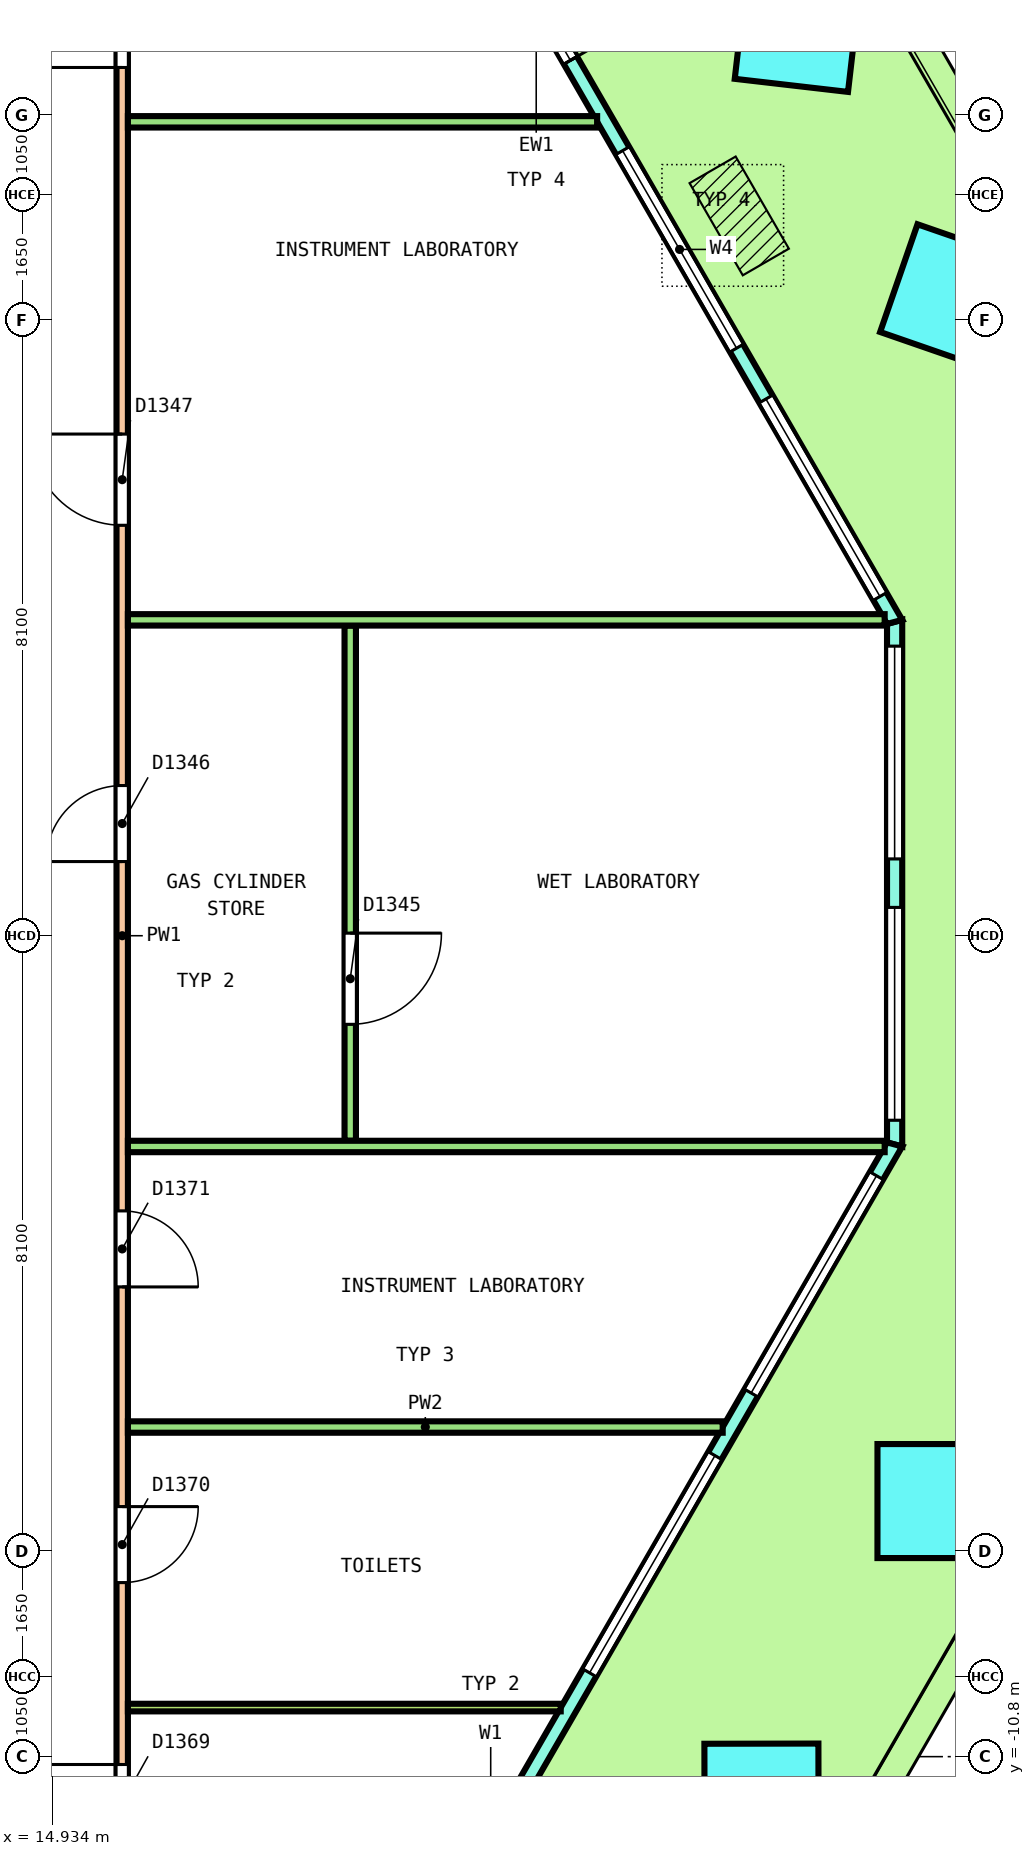
"""IFC4 building model, lengths in metres.
Left out: names, types, materials, properties, quantities, classifications, styles, units other than length and angle.
Written with IfcOpenShell. Run it as: python <this file> out.ifc"""

import sys

from ifc_helpers import new_model, si_unit, direction, frame, frame_2d, origin, origin_2d, place, context, subcontext, project, spatial, polyline, rectangle, outline, extrude, element, fill, save


model = new_model("IFC4")
c1 = context("Model", 3, precision=1e-05, world=origin(), true_north=direction((0.0, 1.0)))
c2 = subcontext(c1, "Body", "Model", "MODEL_VIEW")
j1 = project(units=[si_unit("LENGTHUNIT", "METRE"), si_unit("PLANEANGLEUNIT", "RADIAN")], contexts=[c1])
p1 = place(None, origin())
s1 = spatial("IfcSite", under=j1, at=p1, CompositionType="ELEMENT")
p2 = place(p1, origin())
s2 = spatial("IfcBuilding", under=s1, at=p2, CompositionType="ELEMENT")
p3 = place(p2, frame((0.0, 0.0, 36.6)))
s3 = spatial("IfcBuildingStorey", under=s2, at=p3, CompositionType="ELEMENT", Elevation=36.6)
p4 = place(p3, frame((26.776, 8.406, 0.0), z_axis=(0.021750666956, 0.025184982791, 0.999446159195), x_axis=(-0.501141735437, 0.865296589037, -0.010898348669)))
e1 = element("IfcColumn", 1, at=p4, inside=s3, PredefinedType="COLUMN", context=c2, shape_type="SweptSolid", body=[
    extrude(rectangle(XDim=1.5, YDim=1.5, at=origin_2d()), origin(), (0.0, 0.0, 1.0), 4.052),
])
p5 = place(p3, frame((24.74, 11.932, 0.0), z_axis=(0.025367110012, 0.018859632859, 0.999500287133), x_axis=(-0.500693075872, 0.865617292239, -0.003625899899)))
e2 = element("IfcColumn", 2, at=p5, inside=s3, PredefinedType="COLUMN", context=c2, shape_type="SweptSolid", body=[
    extrude(rectangle(XDim=1.5, YDim=1.5, at=origin_2d()), origin(), (0.0, 0.0, 1.0), 4.052),
])
p6 = place(p3, frame((24.261, -11.379, 0.0), z_axis=(0.003616977835, 0.006269428248, 0.999973805527), x_axis=(0.498177151135, 0.867045061108, -0.007237962107)))
e3 = element("IfcColumn", 3, at=p6, inside=s3, PredefinedType="COLUMN", context=c2, shape_type="SweptSolid", body=[
    extrude(rectangle(XDim=1.5, YDim=1.5, at=origin_2d()), origin(), (0.0, 0.0, 1.0), 4.05),
])
p7 = place(p3, frame((26.536, -7.438, 0.0), z_axis=(0.010848648059, 0.01886459357, 0.999763188933), x_axis=(0.498562444949, 0.866580592009, -0.021761572546)))
e4 = element("IfcColumn", 4, at=p7, inside=s3, PredefinedType="COLUMN", context=c2, shape_type="SweptSolid", body=[
    extrude(rectangle(XDim=1.5, YDim=1.5, at=origin_2d()), origin(), (0.0, 0.0, 1.0), 4.051),
])
p8 = place(p3, frame((26.012, -2.746, 0.0), z_axis=(0.0, 0.0, 1.0), x_axis=(0.0, 1.0, 0.0)))
e5 = element("IfcWall", 5, at=p8, inside=s3, PredefinedType="SOLIDWALL", context=c2, shape_type="SweptSolid", body=[
    extrude(outline(polyline([(-0.027, -0.1), (1.128, -0.1), (2.282, -0.1), (3.437, -0.1), (4.592, -0.1), (5.747, -0.1), (6.901, -0.1), (6.848, 0.1), (5.711, 0.1), (4.574, 0.1), (3.437, 0.1), (2.301, 0.1), (1.164, 0.1), (0.027, 0.1), (-0.027, -0.1)])), origin(), (0.0, 0.0, 1.0), 4.1),
])
p9 = place(p8, frame((0.319, 0.0, 0.1)))
e6 = element("IfcOpeningElement", 6, at=p9, cuts=e5, PredefinedType="OPENING", context=c2, shape_type="SweptSolid", body=[
    extrude(rectangle(XDim=2.8, YDim=2.9, at=frame_2d((1.4, 1.45))), frame((0.0, 0.11, 0.0), z_axis=(0.0, -1.0, 0.0), x_axis=(1.0, 0.0, 0.0)), (0.0, 0.0, 1.0), 0.22),
])
p10 = place(p8, frame((3.756, 0.0, 0.1)))
e7 = element("IfcOpeningElement", 7, at=p10, cuts=e5, PredefinedType="OPENING", context=c2, shape_type="SweptSolid", body=[
    extrude(rectangle(XDim=2.8, YDim=2.9, at=frame_2d((1.4, 1.45))), frame((0.0, 0.11, 0.0), z_axis=(0.0, -1.0, 0.0), x_axis=(1.0, 0.0, 0.0)), (0.0, 0.0, 1.0), 0.22),
])
p11 = place(p3, frame((26.012, 4.129, 0.0), z_axis=(0.0, 0.0, 1.0), x_axis=(-0.499999588275, 0.866025641494, 0.0)))
e8 = element("IfcWall", 8, at=p11, inside=s3, PredefinedType="SOLIDWALL", context=c2, shape_type="SweptSolid", body=[
    extrude(outline(polyline([(-0.027, -0.1), (1.024, -0.1), (2.075, -0.1), (3.125, -0.1), (4.176, -0.1), (5.227, -0.1), (6.278, -0.1), (7.329, -0.1), (8.38, -0.1), (9.43, -0.1), (10.481, -0.1), (11.532, -0.1), (12.583, -0.1), (13.634, -0.1), (14.685, -0.1), (15.735, -0.1), (16.786, -0.1), (17.837, -0.1), (18.888, -0.1), (18.834, 0.1), (17.789, 0.1), (16.744, 0.1), (15.699, 0.1), (14.655, 0.1), (13.61, 0.1), (12.565, 0.1), (11.52, 0.1), (10.475, 0.1), (9.43, 0.1), (8.385, 0.1), (7.341, 0.1), (6.296, 0.1), (5.251, 0.1), (4.206, 0.1), (3.161, 0.1), (2.116, 0.1), (1.072, 0.1), (0.027, 0.1), (-0.027, -0.1)])), origin(), (0.0, 0.0, 1.0), 4.1),
])
p12 = place(p11, frame((0.386, 0.0, 0.1)))
e9 = element("IfcOpeningElement", 9, at=p12, cuts=e8, PredefinedType="OPENING", context=c2, shape_type="SweptSolid", body=[
    extrude(rectangle(XDim=3.0, YDim=2.9, at=frame_2d((1.5, 1.45))), frame((0.0, 0.11, 0.0), z_axis=(0.0, -1.0, 0.0), x_axis=(1.0, 0.0, 0.0)), (0.0, 0.0, 1.0), 0.22),
])
p13 = place(p11, frame((4.158, 0.0, 0.1)))
e10 = element("IfcOpeningElement", 10, at=p13, cuts=e8, PredefinedType="OPENING", context=c2, shape_type="SweptSolid", body=[
    extrude(rectangle(XDim=3.0, YDim=2.9, at=frame_2d((1.5, 1.45))), frame((0.0, 0.11, 0.0), z_axis=(0.0, -1.0, 0.0), x_axis=(1.0, 0.0, 0.0)), (0.0, 0.0, 1.0), 0.22),
])
p14 = place(p11, frame((8.531, 0.0, 0.0)))
e11 = element("IfcOpeningElement", 11, at=p14, cuts=e8, PredefinedType="OPENING", context=c2, shape_type="SweptSolid", body=[
    extrude(rectangle(XDim=1.8, YDim=2.4, at=frame_2d((0.9, 1.2))), frame((0.0, 0.11, 0.0), z_axis=(0.0, -1.0, 0.0), x_axis=(1.0, 0.0, 0.0)), (0.0, 0.0, 1.0), 0.22),
])
p15 = place(p11, frame((8.531, 0.0, 2.55)))
e12 = element("IfcOpeningElement", 12, at=p15, cuts=e8, PredefinedType="OPENING", context=c2, shape_type="SweptSolid", body=[
    extrude(rectangle(XDim=1.8, YDim=0.45, at=frame_2d((0.9, 0.225))), frame((0.0, 0.11, 0.0), z_axis=(0.0, -1.0, 0.0), x_axis=(1.0, 0.0, 0.0)), (0.0, 0.0, 1.0), 0.22),
])
p16 = place(p11, frame((11.703, 0.0, 0.1)))
e13 = element("IfcOpeningElement", 13, at=p16, cuts=e8, PredefinedType="OPENING", context=c2, shape_type="SweptSolid", body=[
    extrude(rectangle(XDim=3.0, YDim=2.9, at=frame_2d((1.5, 1.45))), frame((0.0, 0.11, 0.0), z_axis=(0.0, -1.0, 0.0), x_axis=(1.0, 0.0, 0.0)), (0.0, 0.0, 1.0), 0.22),
])
p17 = place(p11, frame((15.475, 0.0, 0.1)))
e14 = element("IfcOpeningElement", 14, at=p17, cuts=e8, PredefinedType="OPENING", context=c2, shape_type="SweptSolid", body=[
    extrude(rectangle(XDim=3.0, YDim=2.9, at=frame_2d((1.5, 1.45))), frame((0.0, 0.11, 0.0), z_axis=(0.0, -1.0, 0.0), x_axis=(1.0, 0.0, 0.0)), (0.0, 0.0, 1.0), 0.22),
])
p18 = place(p3, frame((15.384, -21.154, 0.0), z_axis=(0.0, 0.0, 1.0), x_axis=(0.499998188434, 0.86602644969, 0.0)))
e15 = element("IfcWall", 15, at=p18, inside=s3, PredefinedType="SOLIDWALL", context=c2, shape_type="SweptSolid", body=[
    extrude(outline(polyline([(-0.027, -0.1), (0.988, -0.1), (2.003, -0.1), (3.017, -0.1), (4.032, -0.1), (5.047, -0.1), (6.062, -0.1), (7.076, -0.1), (8.091, -0.1), (9.106, -0.1), (10.121, -0.1), (11.135, -0.1), (12.15, -0.1), (13.165, -0.1), (14.179, -0.1), (15.194, -0.1), (16.209, -0.1), (17.224, -0.1), (18.239, -0.1), (19.253, -0.1), (20.268, -0.1), (21.283, -0.1), (21.229, 0.1), (20.219, 0.1), (19.21, 0.1), (18.2, 0.1), (17.19, 0.1), (16.181, 0.1), (15.171, 0.1), (14.162, 0.1), (13.152, 0.1), (12.142, 0.1), (11.133, 0.1), (10.123, 0.1), (9.114, 0.1), (8.104, 0.1), (7.094, 0.1), (6.085, 0.1), (5.075, 0.1), (4.065, 0.1), (3.056, 0.1), (2.046, 0.1), (1.036, 0.1), (0.027, 0.1), (-0.027, -0.1)])), origin(), (0.0, 0.0, 1.0), 4.1),
])
p19 = place(p18, frame((0.476, 0.0, 0.1)))
e16 = element("IfcOpeningElement", 16, at=p19, cuts=e15, PredefinedType="OPENING", context=c2, shape_type="SweptSolid", body=[
    extrude(rectangle(XDim=3.3, YDim=2.9, at=frame_2d((1.65, 1.45))), frame((0.0, 0.11, 0.0), z_axis=(0.0, -1.0, 0.0), x_axis=(1.0, 0.0, 0.0)), (0.0, 0.0, 1.0), 0.22),
])
p20 = place(p18, frame((4.727, 0.0, 0.1)))
e17 = element("IfcOpeningElement", 17, at=p20, cuts=e15, PredefinedType="OPENING", context=c2, shape_type="SweptSolid", body=[
    extrude(rectangle(XDim=3.3, YDim=2.9, at=frame_2d((1.65, 1.45))), frame((0.0, 0.11, 0.0), z_axis=(0.0, -1.0, 0.0), x_axis=(1.0, 0.0, 0.0)), (0.0, 0.0, 1.0), 0.22),
])
p21 = place(p18, frame((9.728, 0.0, 0.0)))
e18 = element("IfcOpeningElement", 18, at=p21, cuts=e15, PredefinedType="OPENING", context=c2, shape_type="SweptSolid", body=[
    extrude(rectangle(XDim=1.8, YDim=2.4, at=frame_2d((0.9, 1.2))), frame((0.0, 0.11, 0.0), z_axis=(0.0, -1.0, 0.0), x_axis=(1.0, 0.0, 0.0)), (0.0, 0.0, 1.0), 0.22),
])
p22 = place(p18, frame((9.728, 0.0, 2.55)))
e19 = element("IfcOpeningElement", 19, at=p22, cuts=e15, PredefinedType="OPENING", context=c2, shape_type="SweptSolid", body=[
    extrude(rectangle(XDim=1.8, YDim=0.45, at=frame_2d((0.9, 0.225))), frame((0.0, 0.11, 0.0), z_axis=(0.0, -1.0, 0.0), x_axis=(1.0, 0.0, 0.0)), (0.0, 0.0, 1.0), 0.22),
])
p23 = place(p18, frame((13.229, 0.0, 0.1)))
e20 = element("IfcOpeningElement", 20, at=p23, cuts=e15, PredefinedType="OPENING", context=c2, shape_type="SweptSolid", body=[
    extrude(rectangle(XDim=3.3, YDim=2.9, at=frame_2d((1.65, 1.45))), frame((0.0, 0.11, 0.0), z_axis=(0.0, -1.0, 0.0), x_axis=(1.0, 0.0, 0.0)), (0.0, 0.0, 1.0), 0.22),
])
p24 = place(p18, frame((17.48, 0.0, 0.1)))
e21 = element("IfcOpeningElement", 21, at=p24, cuts=e15, PredefinedType="OPENING", context=c2, shape_type="SweptSolid", body=[
    extrude(rectangle(XDim=3.3, YDim=2.9, at=frame_2d((1.65, 1.45))), frame((0.0, 0.11, 0.0), z_axis=(0.0, -1.0, 0.0), x_axis=(1.0, 0.0, 0.0)), (0.0, 0.0, 1.0), 0.22),
])
p25 = place(p3, frame((15.85, -13.375, 0.0), z_axis=(0.0, 0.0, 1.0), x_axis=(0.0, 1.0, 0.0)))
e22 = element("IfcWall", 22, at=p25, inside=s3, PredefinedType="PARTITIONING", context=c2, shape_type="SweptSolid", body=[
    extrude(rectangle(XDim=26.75, YDim=0.15, at=frame_2d((13.375, 0.0))), origin(), (0.0, 0.0, 1.0), 3.05),
])
p26 = place(p25, frame((14.351, 0.0, 0.0)))
e23 = element("IfcOpeningElement", 23, at=p26, cuts=e22, PredefinedType="OPENING", context=c2, shape_type="SweptSolid", body=[
    extrude(rectangle(XDim=1.0, YDim=2.1, at=frame_2d((0.5, 1.05))), frame((0.0, 0.085, 0.0), z_axis=(0.0, -1.0, 0.0), x_axis=(1.0, 0.0, 0.0)), (0.0, 0.0, 1.0), 0.17),
])
p27 = place(p25, frame((18.775, 0.0, 0.0)))
e24 = element("IfcOpeningElement", 24, at=p27, cuts=e22, PredefinedType="OPENING", context=c2, shape_type="SweptSolid", body=[
    extrude(rectangle(XDim=1.2, YDim=2.1, at=frame_2d((0.6, 1.05))), frame((0.0, 0.085, 0.0), z_axis=(0.0, -1.0, 0.0), x_axis=(1.0, 0.0, 0.0)), (0.0, 0.0, 1.0), 0.17),
])
p28 = place(p25, frame((24.798, 0.0, 0.0)))
e25 = element("IfcOpeningElement", 25, at=p28, cuts=e22, PredefinedType="OPENING", context=c2, shape_type="SweptSolid", body=[
    extrude(rectangle(XDim=1.0, YDim=2.1, at=frame_2d((0.5, 1.05))), frame((0.0, 0.085, 0.0), z_axis=(0.0, -1.0, 0.0), x_axis=(1.0, 0.0, 0.0)), (0.0, 0.0, 1.0), 0.17),
])
p29 = place(p25, frame((1.472, 0.0, 0.0)))
e26 = element("IfcOpeningElement", 26, at=p29, cuts=e22, PredefinedType="OPENING", context=c2, shape_type="SweptSolid", body=[
    extrude(rectangle(XDim=1.0, YDim=2.1, at=frame_2d((0.5, 1.05))), frame((0.0, 0.085, 0.0), z_axis=(0.0, -1.0, 0.0), x_axis=(1.0, 0.0, 0.0)), (0.0, 0.0, 1.0), 0.17),
])
p30 = place(p25, frame((4.865, 0.0, 0.0)))
e27 = element("IfcOpeningElement", 27, at=p30, cuts=e22, PredefinedType="OPENING", context=c2, shape_type="SweptSolid", body=[
    extrude(rectangle(XDim=1.0, YDim=2.1, at=frame_2d((0.5, 1.05))), frame((0.0, 0.085, 0.0), z_axis=(0.0, -1.0, 0.0), x_axis=(1.0, 0.0, 0.0)), (0.0, 0.0, 1.0), 0.17),
])
p31 = place(p25, frame((8.754, 0.0, 0.0)))
e28 = element("IfcOpeningElement", 28, at=p31, cuts=e22, PredefinedType="OPENING", context=c2, shape_type="SweptSolid", body=[
    extrude(rectangle(XDim=1.0, YDim=2.1, at=frame_2d((0.5, 1.05))), frame((0.0, 0.085, 0.0), z_axis=(0.0, -1.0, 0.0), x_axis=(1.0, 0.0, 0.0)), (0.0, 0.0, 1.0), 0.17),
])
p32 = place(p3, frame((18.85, -2.698, 0.0), z_axis=(0.0, 0.0, 1.0), x_axis=(0.0, 1.0, 0.0)))
e29 = element("IfcWall", 29, at=p32, inside=s3, PredefinedType="PARTITIONING", context=c2, shape_type="SweptSolid", body=[
    extrude(rectangle(XDim=6.778, YDim=0.15, at=frame_2d((3.389, 0.0))), origin(), (0.0, 0.0, 1.0), 3.05),
])
p33 = place(p32, frame((1.532, 0.0, 0.0)))
e30 = element("IfcOpeningElement", 30, at=p33, cuts=e29, PredefinedType="OPENING", context=c2, shape_type="SweptSolid", body=[
    extrude(rectangle(XDim=1.2, YDim=2.1, at=frame_2d((0.6, 1.05))), frame((0.0, 0.085, 0.0), z_axis=(0.0, -1.0, 0.0), x_axis=(1.0, 0.0, 0.0)), (0.0, 0.0, 1.0), 0.17),
])
for number, where, z_axis, x_axis in (
    (31, (15.925, 4.156, 0.0), (0.0, 0.0, 1.0), (1.0, 0.0, 0.0)),
    (32, (15.925, -2.773, 0.0), (0.0, 0.0, 1.0), (1.0, 0.0, 0.0)),
):
    element("IfcWall", number, at=place(p3, frame(where, z_axis=z_axis, x_axis=x_axis)), inside=s3, PredefinedType="PARTITIONING", context=c2, shape_type="SweptSolid", body=[
        extrude(rectangle(XDim=9.956, YDim=0.15, at=frame_2d((4.978, 0.0))), origin(), (0.0, 0.0, 1.0), 3.05),
    ])
p34 = place(p3, frame((15.925, 10.708, 0.0), z_axis=(0.0, 0.0, 1.0), x_axis=(1.0, 0.0, 0.0)))
e33 = element("IfcWall", 33, at=p34, inside=s3, PredefinedType="PARTITIONING", context=c2, shape_type="SweptSolid", body=[
    extrude(rectangle(XDim=6.173, YDim=0.15, at=frame_2d((3.086, 0.0))), origin(), (0.0, 0.0, 1.0), 3.05),
])
p35 = place(p3, frame((15.925, -6.464, 0.0), z_axis=(0.0, 0.0, 1.0), x_axis=(1.0, 0.0, 0.0)))
e34 = element("IfcWall", 34, at=p35, inside=s3, PredefinedType="PARTITIONING", context=c2, shape_type="SweptSolid", body=[
    extrude(rectangle(XDim=7.825, YDim=0.15, at=frame_2d((3.913, 0.0))), origin(), (0.0, 0.0, 1.0), 3.05),
])
p36 = place(p3, frame((15.925, -10.155, 0.0), z_axis=(0.0, 0.0, 1.0), x_axis=(1.0, 0.0, 0.0)))
e35 = element("IfcWall", 35, at=p36, inside=s3, PredefinedType="PARTITIONING", context=c2, shape_type="SweptSolid", body=[
    extrude(rectangle(XDim=5.694, YDim=0.1, at=frame_2d((2.847, 0.0))), origin(), (0.0, 0.0, 1.0), 3.05),
])
p37 = place(p9, origin())
e36 = element("IfcWindow", 36, at=p37, inside=s3, PartitioningType="SINGLE_PANEL", PredefinedType="WINDOW", context=c2, shape_type="SweptSolid", body=[
    extrude(rectangle(XDim=2.8, YDim=2.9, at=frame_2d((1.4, 1.45))), frame((0.0, 0.03, 0.0), z_axis=(0.0, -1.0, 0.0), x_axis=(1.0, 0.0, 0.0)), (0.0, 0.0, 1.0), 0.06),
])
fill(e6, e36)
p38 = place(p10, origin())
e37 = element("IfcWindow", 37, at=p38, inside=s3, PartitioningType="SINGLE_PANEL", PredefinedType="WINDOW", context=c2, shape_type="SweptSolid", body=[
    extrude(rectangle(XDim=2.8, YDim=2.9, at=frame_2d((1.4, 1.45))), frame((0.0, 0.03, 0.0), z_axis=(0.0, -1.0, 0.0), x_axis=(1.0, 0.0, 0.0)), (0.0, 0.0, 1.0), 0.06),
])
fill(e7, e37)
p39 = place(p12, origin())
e38 = element("IfcWindow", 38, at=p39, inside=s3, PartitioningType="SINGLE_PANEL", PredefinedType="WINDOW", context=c2, shape_type="SweptSolid", body=[
    extrude(rectangle(XDim=3.0, YDim=2.9, at=frame_2d((1.5, 1.45))), frame((0.0, 0.03, 0.0), z_axis=(0.0, -1.0, 0.0), x_axis=(1.0, 0.0, 0.0)), (0.0, 0.0, 1.0), 0.06),
])
fill(e9, e38)
p40 = place(p13, origin())
e39 = element("IfcWindow", 39, at=p40, inside=s3, PartitioningType="SINGLE_PANEL", PredefinedType="WINDOW", context=c2, shape_type="SweptSolid", body=[
    extrude(rectangle(XDim=3.0, YDim=2.9, at=frame_2d((1.5, 1.45))), frame((0.0, 0.03, 0.0), z_axis=(0.0, -1.0, 0.0), x_axis=(1.0, 0.0, 0.0)), (0.0, 0.0, 1.0), 0.06),
])
fill(e10, e39)
p41 = place(p14, origin())
e40 = element("IfcDoor", 40, at=p41, inside=s3, OperationType="DOUBLE_DOOR_SINGLE_SWING", PredefinedType="DOOR", context=c2, shape_type="SweptSolid", body=[
    extrude(rectangle(XDim=1.8, YDim=2.4, at=frame_2d((0.9, 1.2))), frame((0.0, 0.025, 0.0), z_axis=(0.0, -1.0, 0.0), x_axis=(1.0, 0.0, 0.0)), (0.0, 0.0, 1.0), 0.05),
])
fill(e11, e40)
p42 = place(p15, origin())
e41 = element("IfcWindow", 41, at=p42, inside=s3, PartitioningType="SINGLE_PANEL", PredefinedType="WINDOW", context=c2, shape_type="SweptSolid", body=[
    extrude(rectangle(XDim=1.8, YDim=0.45, at=frame_2d((0.9, 0.225))), frame((0.0, 0.03, 0.0), z_axis=(0.0, -1.0, 0.0), x_axis=(1.0, 0.0, 0.0)), (0.0, 0.0, 1.0), 0.06),
])
fill(e12, e41)
p43 = place(p23, origin())
e42 = element("IfcWindow", 42, at=p43, inside=s3, PartitioningType="SINGLE_PANEL", PredefinedType="WINDOW", context=c2, shape_type="SweptSolid", body=[
    extrude(rectangle(XDim=3.3, YDim=2.9, at=frame_2d((1.65, 1.45))), frame((0.0, 0.03, 0.0), z_axis=(0.0, -1.0, 0.0), x_axis=(1.0, 0.0, 0.0)), (0.0, 0.0, 1.0), 0.06),
])
fill(e20, e42)
p44 = place(p24, origin())
e43 = element("IfcWindow", 43, at=p44, inside=s3, PartitioningType="SINGLE_PANEL", PredefinedType="WINDOW", context=c2, shape_type="SweptSolid", body=[
    extrude(rectangle(XDim=3.3, YDim=2.9, at=frame_2d((1.65, 1.45))), frame((0.0, 0.03, 0.0), z_axis=(0.0, -1.0, 0.0), x_axis=(1.0, 0.0, 0.0)), (0.0, 0.0, 1.0), 0.06),
])
fill(e21, e43)
p45 = place(p33, origin())
e44 = element("IfcDoor", 44, at=p45, inside=s3, OperationType="DOUBLE_DOOR_SINGLE_SWING", PredefinedType="DOOR", context=c2, shape_type="SweptSolid", body=[
    extrude(rectangle(XDim=1.2, YDim=2.1, at=frame_2d((0.6, 1.05))), frame((0.0, 0.025, 0.0), z_axis=(0.0, -1.0, 0.0), x_axis=(1.0, 0.0, 0.0)), (0.0, 0.0, 1.0), 0.05),
])
fill(e30, e44)
p46 = place(p26, origin())
e45 = element("IfcDoor", 45, at=p46, inside=s3, OperationType="SINGLE_SWING_RIGHT", PredefinedType="DOOR", context=c2, shape_type="SweptSolid", body=[
    extrude(rectangle(XDim=1.0, YDim=2.1, at=frame_2d((0.5, 1.05))), frame((0.0, 0.025, 0.0), z_axis=(0.0, -1.0, 0.0), x_axis=(1.0, 0.0, 0.0)), (0.0, 0.0, 1.0), 0.05),
])
fill(e23, e45)
p47 = place(p27, origin())
e46 = element("IfcDoor", 46, at=p47, inside=s3, OperationType="DOUBLE_DOOR_SINGLE_SWING", PredefinedType="DOOR", context=c2, shape_type="SweptSolid", body=[
    extrude(rectangle(XDim=1.2, YDim=2.1, at=frame_2d((0.6, 1.05))), frame((0.0, 0.025, 0.0), z_axis=(0.0, -1.0, 0.0), x_axis=(1.0, 0.0, 0.0)), (0.0, 0.0, 1.0), 0.05),
])
fill(e24, e46)
p48 = place(p28, origin())
e47 = element("IfcDoor", 47, at=p48, inside=s3, OperationType="SINGLE_SWING_LEFT", PredefinedType="DOOR", context=c2, shape_type="SweptSolid", body=[
    extrude(rectangle(XDim=1.0, YDim=2.1, at=frame_2d((0.5, 1.05))), frame((0.0, 0.025, 0.0), z_axis=(0.0, -1.0, 0.0), x_axis=(1.0, 0.0, 0.0)), (0.0, 0.0, 1.0), 0.05),
])
fill(e25, e47)
p49 = place(p29, origin())
e48 = element("IfcDoor", 48, at=p49, inside=s3, OperationType="SINGLE_SWING_RIGHT", PredefinedType="DOOR", context=c2, shape_type="SweptSolid", body=[
    extrude(rectangle(XDim=1.0, YDim=2.1, at=frame_2d((0.5, 1.05))), frame((0.0, 0.025, 0.0), z_axis=(0.0, -1.0, 0.0), x_axis=(1.0, 0.0, 0.0)), (0.0, 0.0, 1.0), 0.05),
])
fill(e26, e48)
p50 = place(p30, origin())
e49 = element("IfcDoor", 49, at=p50, inside=s3, OperationType="SINGLE_SWING_RIGHT", PredefinedType="DOOR", context=c2, shape_type="SweptSolid", body=[
    extrude(rectangle(XDim=1.0, YDim=2.1, at=frame_2d((0.5, 1.05))), frame((0.0, 0.025, 0.0), z_axis=(0.0, -1.0, 0.0), x_axis=(1.0, 0.0, 0.0)), (0.0, 0.0, 1.0), 0.05),
])
fill(e27, e49)
p51 = place(p31, origin())
e50 = element("IfcDoor", 50, at=p51, inside=s3, OperationType="SINGLE_SWING_LEFT", PredefinedType="DOOR", context=c2, shape_type="SweptSolid", body=[
    extrude(rectangle(XDim=1.0, YDim=2.1, at=frame_2d((0.5, 1.05))), frame((0.0, 0.025, 0.0), z_axis=(0.0, -1.0, 0.0), x_axis=(1.0, 0.0, 0.0)), (0.0, 0.0, 1.0), 0.05),
])
fill(e28, e50)
save(model, sys.argv[1])
